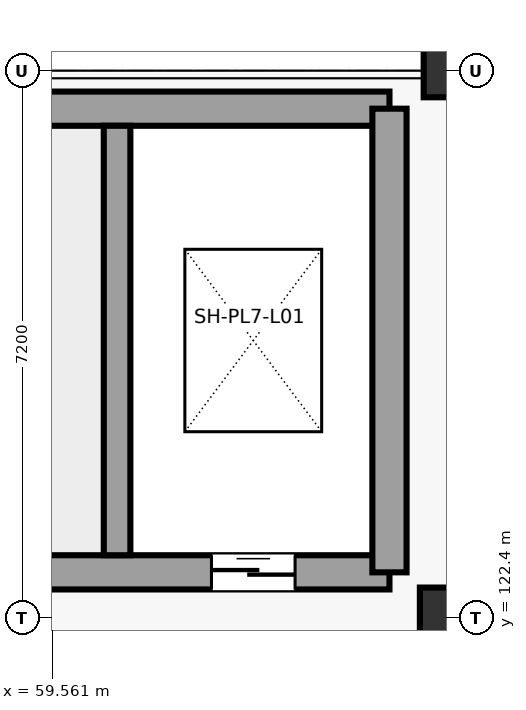
"""IFC4 building model, lengths in metres.
Left out: names, types, materials, properties, quantities, classifications, styles, units other than length and angle.
Written with IfcOpenShell. Run it as: python <this file> out.ifc"""

import sys

from ifc_helpers import new_model, si_unit, direction, frame, frame_2d, origin, origin_2d, place, context, subcontext, project, spatial, rectangle, extrude, element, fill, save


model = new_model("IFC4")
c1 = context("Model", 3, precision=1e-05, world=origin(), true_north=direction((0.0, 1.0)))
c2 = subcontext(c1, "Body", "Model", "MODEL_VIEW")
j1 = project(units=[si_unit("LENGTHUNIT", "METRE"), si_unit("PLANEANGLEUNIT", "RADIAN")], contexts=[c1])
p1 = place(None, origin())
s1 = spatial("IfcSite", under=j1, at=p1, CompositionType="ELEMENT")
p2 = place(p1, origin())
s2 = spatial("IfcBuilding", under=s1, at=p2, CompositionType="ELEMENT")
p3 = place(p2, frame((0.0, 0.0, 5.4)))
s3 = spatial("IfcBuildingStorey", under=s2, at=p3, CompositionType="ELEMENT", Elevation=5.4)
p4 = place(p3, frame((64.8, 122.4, 0.0), z_axis=(0.0, 0.0, 1.0), x_axis=(1.0, 0.0, 0.0)))
e1 = element("IfcColumn", 1, at=p4, inside=s3, PredefinedType="COLUMN", context=c2, shape_type="SweptSolid", body=[
    extrude(rectangle(XDim=0.8, YDim=0.8, at=origin_2d()), origin(), (0.0, 0.0, 1.0), 4.2),
])
p5 = place(p3, frame((64.8, 129.6, 0.0), z_axis=(0.0, 0.0, 1.0), x_axis=(1.0, 0.0, 0.0)))
e2 = element("IfcColumn", 2, at=p5, inside=s3, PredefinedType="COLUMN", context=c2, shape_type="SweptSolid", body=[
    extrude(rectangle(XDim=0.7, YDim=0.7, at=origin_2d()), origin(), (0.0, 0.0, 1.0), 4.2),
])
p6 = place(p3, frame((51.2, 123.0, 0.0), z_axis=(0.0, 0.0, 1.0), x_axis=(1.0, 0.0, 0.0)))
e3 = element("IfcWall", 3, at=p6, inside=s3, PredefinedType="SHEAR", context=c2, shape_type="SweptSolid", body=[
    extrude(rectangle(XDim=12.8, YDim=0.45, at=frame_2d((6.4, 0.0))), origin(), (0.0, 0.0, 1.0), 3.92),
])
p7 = place(p6, frame((0.55, 0.0, 0.0)))
e4 = element("IfcOpeningElement", 4, at=p7, cuts=e3, PredefinedType="OPENING", context=c2, shape_type="SweptSolid", body=[
    extrude(rectangle(XDim=1.2, YDim=2.25, at=frame_2d((0.6, 1.125))), frame((0.0, 0.235, 0.0), z_axis=(0.0, -1.0, 0.0), x_axis=(1.0, 0.0, 0.0)), (0.0, 0.0, 1.0), 0.47),
])
p8 = place(p6, frame((10.458, 0.0, 0.0)))
e5 = element("IfcOpeningElement", 5, at=p8, cuts=e3, PredefinedType="OPENING", context=c2, shape_type="SweptSolid", body=[
    extrude(rectangle(XDim=1.1, YDim=2.2, at=frame_2d((0.55, 1.1))), frame((0.0, 0.235, 0.0), z_axis=(0.0, -1.0, 0.0), x_axis=(1.0, 0.0, 0.0)), (0.0, 0.0, 1.0), 0.47),
])
p9 = place(p3, frame((51.2, 129.1, 0.0), z_axis=(0.0, 0.0, 1.0), x_axis=(1.0, 0.0, 0.0)))
e6 = element("IfcWall", 6, at=p9, inside=s3, PredefinedType="SHEAR", context=c2, shape_type="SweptSolid", body=[
    extrude(rectangle(XDim=12.8, YDim=0.45, at=frame_2d((6.4, 0.0))), origin(), (0.0, 0.0, 1.0), 3.92),
])
p10 = place(p3, frame((64.0, 123.0, 0.0), z_axis=(0.0, 0.0, 1.0), x_axis=(0.0, 1.0, 0.0)))
e7 = element("IfcWall", 7, at=p10, inside=s3, PredefinedType="SHEAR", context=c2, shape_type="SweptSolid", body=[
    extrude(rectangle(XDim=6.1, YDim=0.45, at=frame_2d((3.05, 0.0))), origin(), (0.0, 0.0, 1.0), 3.92),
])
p11 = place(p3, frame((60.416, 123.225, 0.0), z_axis=(0.0, 0.0, 1.0), x_axis=(0.0, 1.0, 0.0)))
e8 = element("IfcWall", 8, at=p11, inside=s3, PredefinedType="SHEAR", context=c2, shape_type="SweptSolid", body=[
    extrude(rectangle(XDim=5.65, YDim=0.35, at=frame_2d((2.825, 0.0))), origin(), (0.0, 0.0, 1.0), 3.92),
])
p12 = place(p8, origin())
e9 = element("IfcDoor", 9, at=p12, inside=s3, OperationType="SLIDING_TO_RIGHT", PredefinedType="DOOR", context=c2, shape_type="SweptSolid", body=[
    extrude(rectangle(XDim=1.1, YDim=2.2, at=frame_2d((0.55, 1.1))), frame((0.0, 0.025, 0.0), z_axis=(0.0, -1.0, 0.0), x_axis=(1.0, 0.0, 0.0)), (0.0, 0.0, 1.0), 0.05),
])
fill(e5, e9)
save(model, sys.argv[1])
